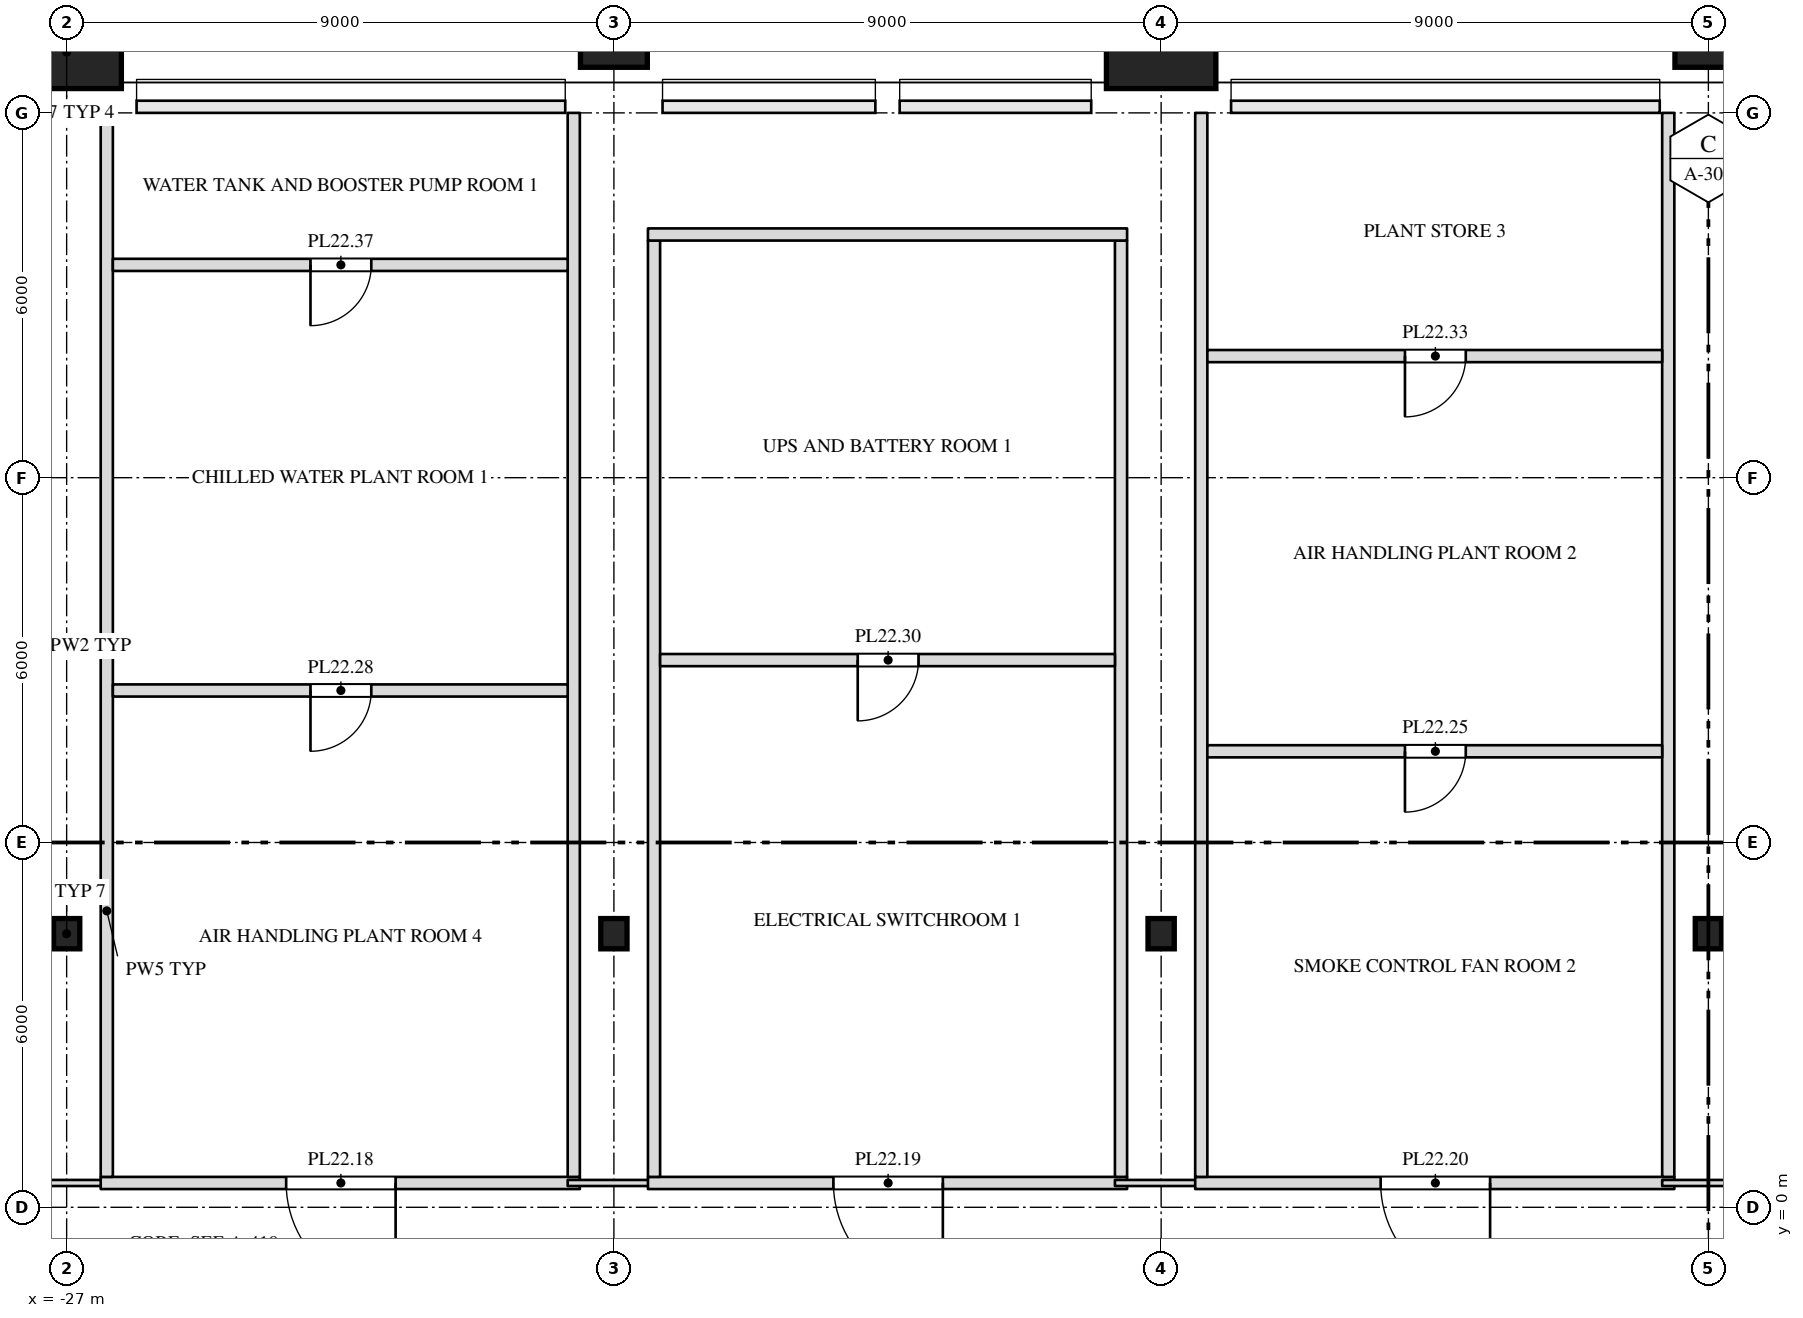
"""IFC4 building model, lengths in metres.
Left out: names, types, materials, properties, quantities, classifications, styles, units other than length and angle.
Written with IfcOpenShell. Run it as: python <this file> out.ifc"""

import sys

from ifc_helpers import new_model, si_unit, direction, frame, frame_2d, origin, origin_2d, place, context, subcontext, project, spatial, rectangle, i_section, extrude, clip, halfspace, element, fill, save


model = new_model("IFC4")
c1 = context("Model", 3, precision=1e-05, world=origin(), true_north=direction((0.0, 1.0)))
c2 = subcontext(c1, "Body", "Model", "MODEL_VIEW")
j1 = project(units=[si_unit("LENGTHUNIT", "METRE"), si_unit("PLANEANGLEUNIT", "RADIAN")], contexts=[c1])
p1 = place(None, origin())
s1 = spatial("IfcSite", under=j1, at=p1, CompositionType="ELEMENT")
p2 = place(p1, origin())
s2 = spatial("IfcBuilding", under=s1, at=p2, CompositionType="ELEMENT")
p3 = place(p2, frame((0.0, 0.0, 104.5)))
s3 = spatial("IfcBuildingStorey", under=s2, at=p3, CompositionType="ELEMENT", Elevation=104.5)
for number, where, z_axis, x_axis in (
    (1, (-27.0, 4.5, 0.0), (0.0, 0.0, 1.0), (1.0, 0.0, 0.0)),
    (2, (-18.0, 4.5, 0.0), (0.0, 0.0, 1.0), (1.0, 0.0, 0.0)),
    (3, (-9.0, 4.5, 0.0), (0.0, 0.0, 1.0), (1.0, 0.0, 0.0)),
    (4, (0.0, 4.5, 0.0), (0.0, 0.0, 1.0), (1.0, 0.0, 0.0)),
):
    element("IfcColumn", number, at=place(p3, frame(where, z_axis=z_axis, x_axis=x_axis)), inside=s3, PredefinedType="COLUMN", context=c2, shape_type="SweptSolid", body=[
        extrude(i_section(OverallWidth=0.432, OverallDepth=0.498, WebThickness=0.056, FlangeThickness=0.089, at=origin_2d()), origin(), (0.0, 0.0, 1.0), 4.0),
    ])
p4 = place(p3, frame((-27.0, 19.0, 0.0), z_axis=(0.0, 0.242535625036, 0.970142500145), x_axis=(-1.0, 0.0, 0.0)))
e5 = element("IfcColumn", 5, at=p4, inside=s3, PredefinedType="COLUMN", context=c2, shape_type="Clipping", body=[
    clip(extrude(rectangle(XDim=1.8, YDim=1.8, at=origin_2d()), origin(), (0.0, 0.0, 1.0), 4.123), halfspace(frame((0.0, 0.0, 3.898)), False)),
])
p5 = place(p3, frame((-18.0, 19.0, 0.0), z_axis=(0.0, 0.242535625036, 0.970142500145), x_axis=(-1.0, 0.0, 0.0)))
e6 = element("IfcColumn", 6, at=p5, inside=s3, PredefinedType="COLUMN", context=c2, shape_type="Clipping", body=[
    clip(extrude(rectangle(XDim=1.1, YDim=1.1, at=origin_2d()), origin(), (0.0, 0.0, 1.0), 4.123), halfspace(frame((0.0, 0.0, 3.986)), False)),
])
p6 = place(p3, frame((-9.0, 19.0, 0.0), z_axis=(0.0, 0.242535625036, 0.970142500145), x_axis=(-1.0, 0.0, 0.0)))
e7 = element("IfcColumn", 7, at=p6, inside=s3, PredefinedType="COLUMN", context=c2, shape_type="Clipping", body=[
    clip(extrude(rectangle(XDim=1.8, YDim=1.8, at=origin_2d()), origin(), (0.0, 0.0, 1.0), 4.123), halfspace(frame((0.0, 0.0, 3.898)), False)),
])
p7 = place(p3, frame((0.0, 19.0, 0.0), z_axis=(0.0, 0.242535625036, 0.970142500145), x_axis=(-1.0, 0.0, 0.0)))
e8 = element("IfcColumn", 8, at=p7, inside=s3, PredefinedType="COLUMN", context=c2, shape_type="Clipping", body=[
    clip(extrude(rectangle(XDim=1.1, YDim=1.1, at=origin_2d()), origin(), (0.0, 0.0, 1.0), 4.123), halfspace(frame((0.0, 0.0, 3.986)), False)),
])
p8 = place(p3, frame((-27.675, 0.4, 0.0), z_axis=(0.0, 0.0, 1.0), x_axis=(1.0, 0.0, 0.0)))
e9 = element("IfcWall", 9, at=p8, inside=s3, PredefinedType="PARTITIONING", context=c2, shape_type="SweptSolid", body=[
    extrude(rectangle(XDim=1.435, YDim=0.1, at=frame_2d((0.718, 0.0))), origin(), (0.0, 0.0, 1.0), 3.8),
])
p9 = place(p3, frame((-26.44, 0.4, 0.0), z_axis=(0.0, 0.0, 1.0), x_axis=(1.0, 0.0, 0.0)))
e10 = element("IfcWall", 10, at=p9, inside=s3, PredefinedType="PARTITIONING", context=c2, shape_type="SweptSolid", body=[
    extrude(rectangle(XDim=7.88, YDim=0.2, at=frame_2d((3.94, 0.0))), origin(), (0.0, 0.0, 1.0), 3.8),
])
p10 = place(p9, frame((3.05, 0.0, 0.0)))
e11 = element("IfcOpeningElement", 11, at=p10, cuts=e10, PredefinedType="OPENING", context=c2, shape_type="SweptSolid", body=[
    extrude(rectangle(XDim=1.8, YDim=2.1, at=frame_2d((0.9, 1.05))), frame((0.0, 0.112, 0.0), z_axis=(0.0, -1.0, 0.0), x_axis=(1.0, 0.0, 0.0)), (0.0, 0.0, 1.0), 0.224),
])
p11 = place(p3, frame((-26.34, 0.5, 0.0), z_axis=(0.0, 0.0, 1.0), x_axis=(0.0, 1.0, 0.0)))
e12 = element("IfcWall", 12, at=p11, inside=s3, PredefinedType="PARTITIONING", context=c2, shape_type="SweptSolid", body=[
    extrude(rectangle(XDim=17.5, YDim=0.2, at=frame_2d((8.75, 0.0))), origin(), (0.0, 0.0, 1.0), 3.8),
])
p12 = place(p3, frame((-18.76, 0.4, 0.0), z_axis=(0.0, 0.0, 1.0), x_axis=(1.0, 0.0, 0.0)))
e13 = element("IfcWall", 13, at=p12, inside=s3, PredefinedType="PARTITIONING", context=c2, shape_type="SweptSolid", body=[
    extrude(rectangle(XDim=1.52, YDim=0.1, at=frame_2d((0.76, 0.0))), origin(), (0.0, 0.0, 1.0), 3.8),
])
p13 = place(p3, frame((-18.66, 0.5, 0.0), z_axis=(0.0, 0.0, 1.0), x_axis=(0.0, 1.0, 0.0)))
e14 = element("IfcWall", 14, at=p13, inside=s3, PredefinedType="PARTITIONING", context=c2, shape_type="SweptSolid", body=[
    extrude(rectangle(XDim=17.5, YDim=0.2, at=frame_2d((8.75, 0.0))), origin(), (0.0, 0.0, 1.0), 3.8),
])
p14 = place(p3, frame((-17.44, 0.4, 0.0), z_axis=(0.0, 0.0, 1.0), x_axis=(1.0, 0.0, 0.0)))
e15 = element("IfcWall", 15, at=p14, inside=s3, PredefinedType="PARTITIONING", context=c2, shape_type="SweptSolid", body=[
    extrude(rectangle(XDim=7.88, YDim=0.2, at=frame_2d((3.94, 0.0))), origin(), (0.0, 0.0, 1.0), 3.8),
])
p15 = place(p14, frame((3.05, 0.0, 0.0)))
e16 = element("IfcOpeningElement", 16, at=p15, cuts=e15, PredefinedType="OPENING", context=c2, shape_type="SweptSolid", body=[
    extrude(rectangle(XDim=1.8, YDim=2.1, at=frame_2d((0.9, 1.05))), frame((0.0, 0.112, 0.0), z_axis=(0.0, -1.0, 0.0), x_axis=(1.0, 0.0, 0.0)), (0.0, 0.0, 1.0), 0.224),
])
p16 = place(p3, frame((-17.34, 0.5, 0.0), z_axis=(0.0, 0.0, 1.0), x_axis=(0.0, 1.0, 0.0)))
e17 = element("IfcWall", 17, at=p16, inside=s3, PredefinedType="PARTITIONING", context=c2, shape_type="SweptSolid", body=[
    extrude(rectangle(XDim=15.4, YDim=0.2, at=frame_2d((7.7, 0.0))), origin(), (0.0, 0.0, 1.0), 3.8),
])
p17 = place(p3, frame((-9.76, 0.4, 0.0), z_axis=(0.0, 0.0, 1.0), x_axis=(1.0, 0.0, 0.0)))
e18 = element("IfcWall", 18, at=p17, inside=s3, PredefinedType="PARTITIONING", context=c2, shape_type="SweptSolid", body=[
    extrude(rectangle(XDim=1.52, YDim=0.1, at=frame_2d((0.76, 0.0))), origin(), (0.0, 0.0, 1.0), 3.8),
])
p18 = place(p3, frame((-9.66, 0.5, 0.0), z_axis=(0.0, 0.0, 1.0), x_axis=(0.0, 1.0, 0.0)))
e19 = element("IfcWall", 19, at=p18, inside=s3, PredefinedType="PARTITIONING", context=c2, shape_type="SweptSolid", body=[
    extrude(rectangle(XDim=15.4, YDim=0.2, at=frame_2d((7.7, 0.0))), origin(), (0.0, 0.0, 1.0), 3.8),
])
p19 = place(p3, frame((-8.44, 0.4, 0.0), z_axis=(0.0, 0.0, 1.0), x_axis=(1.0, 0.0, 0.0)))
e20 = element("IfcWall", 20, at=p19, inside=s3, PredefinedType="PARTITIONING", context=c2, shape_type="SweptSolid", body=[
    extrude(rectangle(XDim=7.88, YDim=0.2, at=frame_2d((3.94, 0.0))), origin(), (0.0, 0.0, 1.0), 3.8),
])
p20 = place(p19, frame((3.05, 0.0, 0.0)))
e21 = element("IfcOpeningElement", 21, at=p20, cuts=e20, PredefinedType="OPENING", context=c2, shape_type="SweptSolid", body=[
    extrude(rectangle(XDim=1.8, YDim=2.1, at=frame_2d((0.9, 1.05))), frame((0.0, 0.112, 0.0), z_axis=(0.0, -1.0, 0.0), x_axis=(1.0, 0.0, 0.0)), (0.0, 0.0, 1.0), 0.224),
])
p21 = place(p3, frame((-8.34, 0.5, 0.0), z_axis=(0.0, 0.0, 1.0), x_axis=(0.0, 1.0, 0.0)))
e22 = element("IfcWall", 22, at=p21, inside=s3, PredefinedType="PARTITIONING", context=c2, shape_type="SweptSolid", body=[
    extrude(rectangle(XDim=17.5, YDim=0.2, at=frame_2d((8.75, 0.0))), origin(), (0.0, 0.0, 1.0), 3.8),
])
p22 = place(p3, frame((-0.76, 0.4, 0.0), z_axis=(0.0, 0.0, 1.0), x_axis=(1.0, 0.0, 0.0)))
e23 = element("IfcWall", 23, at=p22, inside=s3, PredefinedType="PARTITIONING", context=c2, shape_type="SweptSolid", body=[
    extrude(rectangle(XDim=1.52, YDim=0.1, at=frame_2d((0.76, 0.0))), origin(), (0.0, 0.0, 1.0), 3.8),
])
p23 = place(p3, frame((-0.66, 0.5, 0.0), z_axis=(0.0, 0.0, 1.0), x_axis=(0.0, 1.0, 0.0)))
e24 = element("IfcWall", 24, at=p23, inside=s3, PredefinedType="PARTITIONING", context=c2, shape_type="SweptSolid", body=[
    extrude(rectangle(XDim=17.5, YDim=0.2, at=frame_2d((8.75, 0.0))), origin(), (0.0, 0.0, 1.0), 3.8),
])
p24 = place(p3, frame((-8.24, 7.5, 0.0), z_axis=(0.0, 0.0, 1.0), x_axis=(1.0, 0.0, 0.0)))
e25 = element("IfcWall", 25, at=p24, inside=s3, PredefinedType="PARTITIONING", context=c2, shape_type="SweptSolid", body=[
    extrude(rectangle(XDim=7.48, YDim=0.2, at=frame_2d((3.74, 0.0))), origin(), (0.0, 0.0, 1.0), 3.8),
])
p25 = place(p24, frame((3.25, 0.0, 0.0)))
e26 = element("IfcOpeningElement", 26, at=p25, cuts=e25, PredefinedType="OPENING", context=c2, shape_type="SweptSolid", body=[
    extrude(rectangle(XDim=1.0, YDim=2.1, at=frame_2d((0.5, 1.05))), frame((0.0, 0.112, 0.0), z_axis=(0.0, -1.0, 0.0), x_axis=(1.0, 0.0, 0.0)), (0.0, 0.0, 1.0), 0.224),
])
p26 = place(p3, frame((-26.24, 8.5, 0.0), z_axis=(0.0, 0.0, 1.0), x_axis=(1.0, 0.0, 0.0)))
e27 = element("IfcWall", 27, at=p26, inside=s3, PredefinedType="PARTITIONING", context=c2, shape_type="SweptSolid", body=[
    extrude(rectangle(XDim=7.48, YDim=0.2, at=frame_2d((3.74, 0.0))), origin(), (0.0, 0.0, 1.0), 3.8),
])
p27 = place(p26, frame((3.25, 0.0, 0.0)))
e28 = element("IfcOpeningElement", 28, at=p27, cuts=e27, PredefinedType="OPENING", context=c2, shape_type="SweptSolid", body=[
    extrude(rectangle(XDim=1.0, YDim=2.1, at=frame_2d((0.5, 1.05))), frame((0.0, 0.112, 0.0), z_axis=(0.0, -1.0, 0.0), x_axis=(1.0, 0.0, 0.0)), (0.0, 0.0, 1.0), 0.224),
])
p28 = place(p3, frame((-17.24, 9.0, 0.0), z_axis=(0.0, 0.0, 1.0), x_axis=(1.0, 0.0, 0.0)))
e29 = element("IfcWall", 29, at=p28, inside=s3, PredefinedType="PARTITIONING", context=c2, shape_type="SweptSolid", body=[
    extrude(rectangle(XDim=7.48, YDim=0.2, at=frame_2d((3.74, 0.0))), origin(), (0.0, 0.0, 1.0), 3.8),
])
p29 = place(p28, frame((3.25, 0.0, 0.0)))
e30 = element("IfcOpeningElement", 30, at=p29, cuts=e29, PredefinedType="OPENING", context=c2, shape_type="SweptSolid", body=[
    extrude(rectangle(XDim=1.0, YDim=2.1, at=frame_2d((0.5, 1.05))), frame((0.0, 0.112, 0.0), z_axis=(0.0, -1.0, 0.0), x_axis=(1.0, 0.0, 0.0)), (0.0, 0.0, 1.0), 0.224),
])
p30 = place(p3, frame((-8.24, 14.0, 0.0), z_axis=(0.0, 0.0, 1.0), x_axis=(1.0, 0.0, 0.0)))
e31 = element("IfcWall", 31, at=p30, inside=s3, PredefinedType="PARTITIONING", context=c2, shape_type="SweptSolid", body=[
    extrude(rectangle(XDim=7.48, YDim=0.2, at=frame_2d((3.74, 0.0))), origin(), (0.0, 0.0, 1.0), 2.868),
])
p31 = place(p30, frame((3.25, 0.0, 0.0)))
e32 = element("IfcOpeningElement", 32, at=p31, cuts=e31, PredefinedType="OPENING", context=c2, shape_type="SweptSolid", body=[
    extrude(rectangle(XDim=1.0, YDim=2.1, at=frame_2d((0.5, 1.05))), frame((0.0, 0.112, 0.0), z_axis=(0.0, -1.0, 0.0), x_axis=(1.0, 0.0, 0.0)), (0.0, 0.0, 1.0), 0.224),
])
p32 = place(p3, frame((-26.24, 15.5, 0.0), z_axis=(0.0, 0.0, 1.0), x_axis=(1.0, 0.0, 0.0)))
e33 = element("IfcWall", 33, at=p32, inside=s3, PredefinedType="PARTITIONING", context=c2, shape_type="SweptSolid", body=[
    extrude(rectangle(XDim=7.48, YDim=0.2, at=frame_2d((3.74, 0.0))), origin(), (0.0, 0.0, 1.0), 3.8),
])
p33 = place(p32, frame((3.25, 0.0, 0.0)))
e34 = element("IfcOpeningElement", 34, at=p33, cuts=e33, PredefinedType="OPENING", context=c2, shape_type="SweptSolid", body=[
    extrude(rectangle(XDim=1.0, YDim=2.1, at=frame_2d((0.5, 1.05))), frame((0.0, 0.112, 0.0), z_axis=(0.0, -1.0, 0.0), x_axis=(1.0, 0.0, 0.0)), (0.0, 0.0, 1.0), 0.224),
])
p34 = place(p3, frame((-17.44, 16.0, 0.0), z_axis=(0.0, 0.0, 1.0), x_axis=(1.0, 0.0, 0.0)))
e35 = element("IfcWall", 35, at=p34, inside=s3, PredefinedType="PARTITIONING", context=c2, shape_type="SweptSolid", body=[
    extrude(rectangle(XDim=7.88, YDim=0.2, at=frame_2d((3.94, 0.0))), origin(), (0.0, 0.0, 1.0), 3.8),
])
p35 = place(p10, origin())
e36 = element("IfcDoor", 36, at=p35, inside=s3, OperationType="DOUBLE_DOOR_SINGLE_SWING", PredefinedType="DOOR", context=c2, shape_type="SweptSolid", body=[
    extrude(rectangle(XDim=1.8, YDim=2.1, at=frame_2d((0.9, 1.05))), frame((0.0, 0.025, 0.0), z_axis=(0.0, -1.0, 0.0), x_axis=(1.0, 0.0, 0.0)), (0.0, 0.0, 1.0), 0.05),
])
fill(e11, e36)
p36 = place(p15, origin())
e37 = element("IfcDoor", 37, at=p36, inside=s3, OperationType="DOUBLE_DOOR_SINGLE_SWING", PredefinedType="DOOR", context=c2, shape_type="SweptSolid", body=[
    extrude(rectangle(XDim=1.8, YDim=2.1, at=frame_2d((0.9, 1.05))), frame((0.0, 0.025, 0.0), z_axis=(0.0, -1.0, 0.0), x_axis=(1.0, 0.0, 0.0)), (0.0, 0.0, 1.0), 0.05),
])
fill(e16, e37)
p37 = place(p20, origin())
e38 = element("IfcDoor", 38, at=p37, inside=s3, OperationType="DOUBLE_DOOR_SINGLE_SWING", PredefinedType="DOOR", context=c2, shape_type="SweptSolid", body=[
    extrude(rectangle(XDim=1.8, YDim=2.1, at=frame_2d((0.9, 1.05))), frame((0.0, 0.025, 0.0), z_axis=(0.0, -1.0, 0.0), x_axis=(1.0, 0.0, 0.0)), (0.0, 0.0, 1.0), 0.05),
])
fill(e21, e38)
p38 = place(p25, origin())
e39 = element("IfcDoor", 39, at=p38, inside=s3, OperationType="SINGLE_SWING_RIGHT", PredefinedType="DOOR", context=c2, shape_type="SweptSolid", body=[
    extrude(rectangle(XDim=1.0, YDim=2.1, at=frame_2d((0.5, 1.05))), frame((0.0, 0.025, 0.0), z_axis=(0.0, -1.0, 0.0), x_axis=(1.0, 0.0, 0.0)), (0.0, 0.0, 1.0), 0.05),
])
fill(e26, e39)
p39 = place(p27, origin())
e40 = element("IfcDoor", 40, at=p39, inside=s3, OperationType="SINGLE_SWING_RIGHT", PredefinedType="DOOR", context=c2, shape_type="SweptSolid", body=[
    extrude(rectangle(XDim=1.0, YDim=2.1, at=frame_2d((0.5, 1.05))), frame((0.0, 0.025, 0.0), z_axis=(0.0, -1.0, 0.0), x_axis=(1.0, 0.0, 0.0)), (0.0, 0.0, 1.0), 0.05),
])
fill(e28, e40)
p40 = place(p29, origin())
e41 = element("IfcDoor", 41, at=p40, inside=s3, OperationType="SINGLE_SWING_RIGHT", PredefinedType="DOOR", context=c2, shape_type="SweptSolid", body=[
    extrude(rectangle(XDim=1.0, YDim=2.1, at=frame_2d((0.5, 1.05))), frame((0.0, 0.025, 0.0), z_axis=(0.0, -1.0, 0.0), x_axis=(1.0, 0.0, 0.0)), (0.0, 0.0, 1.0), 0.05),
])
fill(e30, e41)
p41 = place(p31, origin())
e42 = element("IfcDoor", 42, at=p41, inside=s3, OperationType="SINGLE_SWING_RIGHT", PredefinedType="DOOR", context=c2, shape_type="SweptSolid", body=[
    extrude(rectangle(XDim=1.0, YDim=2.1, at=frame_2d((0.5, 1.05))), frame((0.0, 0.025, 0.0), z_axis=(0.0, -1.0, 0.0), x_axis=(1.0, 0.0, 0.0)), (0.0, 0.0, 1.0), 0.05),
])
fill(e32, e42)
p42 = place(p33, origin())
e43 = element("IfcDoor", 43, at=p42, inside=s3, OperationType="SINGLE_SWING_RIGHT", PredefinedType="DOOR", context=c2, shape_type="SweptSolid", body=[
    extrude(rectangle(XDim=1.0, YDim=2.1, at=frame_2d((0.5, 1.05))), frame((0.0, 0.025, 0.0), z_axis=(0.0, -1.0, 0.0), x_axis=(1.0, 0.0, 0.0)), (0.0, 0.0, 1.0), 0.05),
])
fill(e34, e43)
save(model, sys.argv[1])
